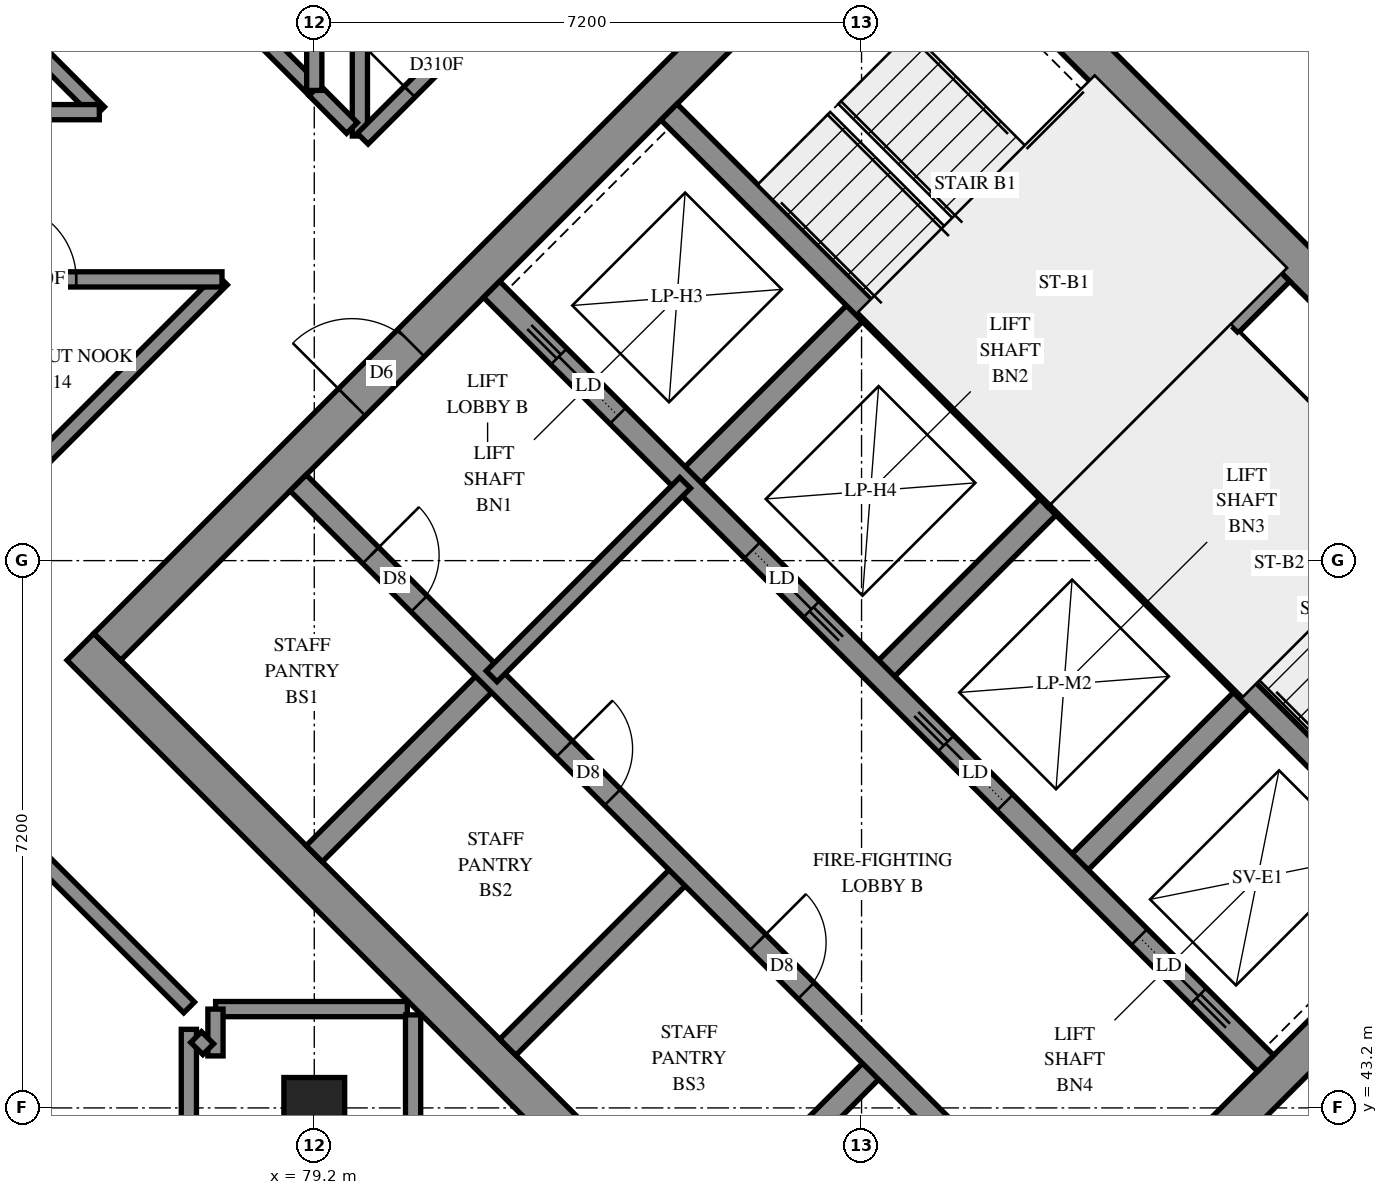
"""IFC4 building model, lengths in metres.
Left out: names, types, materials, properties, quantities, classifications, styles, units other than length and angle.
Written with IfcOpenShell. Run it as: python <this file> out.ifc"""

import sys

from ifc_helpers import new_model, si_unit, direction, frame, frame_2d, origin, origin_2d, place, context, subcontext, project, spatial, rectangle, extrude, element, fill, save


model = new_model("IFC4")
c1 = context("Model", 3, precision=1e-05, world=origin(), true_north=direction((0.0, 1.0)))
c2 = subcontext(c1, "Body", "Model", "MODEL_VIEW")
j1 = project(units=[si_unit("LENGTHUNIT", "METRE"), si_unit("PLANEANGLEUNIT", "RADIAN")], contexts=[c1])
p1 = place(None, origin())
s1 = spatial("IfcSite", under=j1, at=p1, CompositionType="ELEMENT")
p2 = place(p1, origin())
s2 = spatial("IfcBuilding", under=s1, at=p2, CompositionType="ELEMENT")
p3 = place(p2, frame((0.0, 0.0, 199.8)))
s3 = spatial("IfcBuildingStorey", under=s2, at=p3, CompositionType="ELEMENT", Elevation=199.8)
p4 = place(p3, frame((79.2, 43.2, 0.0), z_axis=(0.0, 0.0, 1.0), x_axis=(1.0, 0.0, 0.0)))
e1 = element("IfcColumn", 1, at=p4, inside=s3, PredefinedType="COLUMN", context=c2, shape_type="SweptSolid", body=[
    extrude(rectangle(XDim=0.8, YDim=0.8, at=origin_2d()), origin(), (0.0, 0.0, 1.0), 3.1),
])
p5 = place(p3, frame((76.124, 49.267, -0.3), z_axis=(0.0, 0.0, 1.0), x_axis=(0.7071067812, -0.7071067812, 0.0)))
e2 = element("IfcWall", 2, at=p5, inside=s3, PredefinedType="SHEAR", context=c2, shape_type="SweptSolid", body=[
    extrude(rectangle(XDim=15.4, YDim=0.5, at=frame_2d((7.7, 0.0))), origin(), (0.0, 0.0, 1.0), 2.7),
])
p6 = place(p3, frame((86.66, 59.802, -0.3), z_axis=(0.0, 0.0, 1.0), x_axis=(0.7071067812, -0.7071067812, 0.0)))
e3 = element("IfcWall", 3, at=p6, inside=s3, PredefinedType="SHEAR", context=c2, shape_type="SweptSolid", body=[
    extrude(rectangle(XDim=15.4, YDim=0.5, at=frame_2d((7.7, 0.0))), origin(), (0.0, 0.0, 1.0), 2.7),
])
p7 = place(p6, frame((10.5, 0.0, 0.3)))
e4 = element("IfcOpeningElement", 4, at=p7, cuts=e3, PredefinedType="OPENING", context=c2, shape_type="SweptSolid", body=[
    extrude(rectangle(XDim=0.8, YDim=2.1, at=frame_2d((0.4, 1.05))), frame((0.0, 0.26, 0.0), z_axis=(0.0, -1.0, 0.0), x_axis=(1.0, 0.0, 0.0)), (0.0, 0.0, 1.0), 0.52),
])
p8 = place(p3, frame((76.478, 49.267, -0.3), z_axis=(0.0, 0.0, 1.0), x_axis=(0.7071067812, 0.7071067812, 0.0)))
e5 = element("IfcWall", 5, at=p8, inside=s3, PredefinedType="SHEAR", context=c2, shape_type="SweptSolid", body=[
    extrude(rectangle(XDim=14.4, YDim=0.5, at=frame_2d((7.2, 0.0))), origin(), (0.0, 0.0, 1.0), 2.7),
])
p9 = place(p8, frame((4.55, 0.0, 0.3)))
e6 = element("IfcOpeningElement", 6, at=p9, cuts=e5, PredefinedType="OPENING", context=c2, shape_type="SweptSolid", body=[
    extrude(rectangle(XDim=1.1, YDim=2.1, at=frame_2d((0.55, 1.05))), frame((0.0, 0.26, 0.0), z_axis=(0.0, -1.0, 0.0), x_axis=(1.0, 0.0, 0.0)), (0.0, 0.0, 1.0), 0.52),
])
p10 = place(p8, frame((11.35, 0.0, 0.3)))
e7 = element("IfcOpeningElement", 7, at=p10, cuts=e5, PredefinedType="OPENING", context=c2, shape_type="SweptSolid", body=[
    extrude(rectangle(XDim=1.1, YDim=2.1, at=frame_2d((0.55, 1.05))), frame((0.0, 0.26, 0.0), z_axis=(0.0, -1.0, 0.0), x_axis=(1.0, 0.0, 0.0)), (0.0, 0.0, 1.0), 0.52),
])
p11 = place(p3, frame((87.013, 38.731, -0.3), z_axis=(0.0, 0.0, 1.0), x_axis=(0.7071067812, 0.7071067812, 0.0)))
e8 = element("IfcWall", 8, at=p11, inside=s3, PredefinedType="SHEAR", context=c2, shape_type="SweptSolid", body=[
    extrude(rectangle(XDim=14.4, YDim=0.5, at=frame_2d((7.2, 0.0))), origin(), (0.0, 0.0, 1.0), 2.7),
])
p12 = place(p11, frame((4.55, 0.0, 0.3)))
e9 = element("IfcOpeningElement", 9, at=p12, cuts=e8, PredefinedType="OPENING", context=c2, shape_type="SweptSolid", body=[
    extrude(rectangle(XDim=1.1, YDim=2.1, at=frame_2d((0.55, 1.05))), frame((0.0, 0.26, 0.0), z_axis=(0.0, -1.0, 0.0), x_axis=(1.0, 0.0, 0.0)), (0.0, 0.0, 1.0), 0.52),
])
p13 = place(p11, frame((11.35, 0.0, 0.3)))
e10 = element("IfcOpeningElement", 10, at=p13, cuts=e8, PredefinedType="OPENING", context=c2, shape_type="SweptSolid", body=[
    extrude(rectangle(XDim=1.1, YDim=2.1, at=frame_2d((0.55, 1.05))), frame((0.0, 0.26, 0.0), z_axis=(0.0, -1.0, 0.0), x_axis=(1.0, 0.0, 0.0)), (0.0, 0.0, 1.0), 0.52),
])
for number, where, z_axis, x_axis in (
    (11, (79.2, 46.544, 0.0), (0.0, 0.0, 1.0), (0.707, 0.707, 0.0)),
    (12, (84.079, 51.423, 0.0), (0.0, 0.0, 1.0), (0.707, 0.707, 0.0)),
):
    element("IfcWall", number, at=place(p3, frame(where, z_axis=z_axis, x_axis=x_axis)), inside=s3, PredefinedType="SOLIDWALL", context=c2, shape_type="SweptSolid", body=[
        extrude(rectangle(XDim=3.3, YDim=0.3, at=frame_2d((1.65, 0.0))), origin(), (0.0, 0.0, 1.0), 3.1),
    ])
p14 = place(p3, frame((81.746, 43.999, 0.0), z_axis=(0.0, 0.0, 1.0), x_axis=(0.7071067812, 0.7071067812, 0.0)))
e13 = element("IfcWall", 13, at=p14, inside=s3, PredefinedType="SOLIDWALL", context=c2, shape_type="SweptSolid", body=[
    extrude(rectangle(XDim=3.3, YDim=0.3, at=frame_2d((1.65, 0.0))), origin(), (0.0, 0.0, 1.0), 3.1),
])
p15 = place(p3, frame((86.625, 48.878, 0.0), z_axis=(0.0, 0.0, 1.0), x_axis=(0.7071067812, 0.7071067812, 0.0)))
e14 = element("IfcWall", 14, at=p15, inside=s3, PredefinedType="SOLIDWALL", context=c2, shape_type="SweptSolid", body=[
    extrude(rectangle(XDim=3.3, YDim=0.3, at=frame_2d((1.65, 0.0))), origin(), (0.0, 0.0, 1.0), 3.1),
])
p16 = place(p3, frame((84.291, 41.453, 0.0), z_axis=(0.0, 0.0, 1.0), x_axis=(0.7071067812, 0.7071067812, 0.0)))
e15 = element("IfcWall", 15, at=p16, inside=s3, PredefinedType="SOLIDWALL", context=c2, shape_type="SweptSolid", body=[
    extrude(rectangle(XDim=3.3, YDim=0.3, at=frame_2d((1.65, 0.0))), origin(), (0.0, 0.0, 1.0), 3.1),
])
p17 = place(p3, frame((89.17, 46.332, 0.0), z_axis=(0.0, 0.0, 1.0), x_axis=(0.7071067812, 0.7071067812, 0.0)))
e16 = element("IfcWall", 16, at=p17, inside=s3, PredefinedType="SOLIDWALL", context=c2, shape_type="SweptSolid", body=[
    extrude(rectangle(XDim=3.3, YDim=0.3, at=frame_2d((1.65, 0.0))), origin(), (0.0, 0.0, 1.0), 3.1),
])
p18 = place(p3, frame((78.988, 51.423, 0.0), z_axis=(0.0, 0.0, 1.0), x_axis=(0.7071067812, -0.7071067812, 0.0)))
e17 = element("IfcWall", 17, at=p18, inside=s3, PredefinedType="SOLIDWALL", context=c2, shape_type="SweptSolid", body=[
    extrude(rectangle(XDim=14.4, YDim=0.3, at=frame_2d((7.2, 0.0))), origin(), (0.0, 0.0, 1.0), 3.1),
])
p19 = place(p18, frame((1.35, 0.0, 0.0)))
e18 = element("IfcOpeningElement", 18, at=p19, cuts=e17, PredefinedType="OPENING", context=c2, shape_type="SweptSolid", body=[
    extrude(rectangle(XDim=0.9, YDim=2.1, at=frame_2d((0.45, 1.05))), frame((0.0, 0.16, 0.0), z_axis=(0.0, -1.0, 0.0), x_axis=(1.0, 0.0, 0.0)), (0.0, 0.0, 1.0), 0.32),
])
p20 = place(p18, frame((4.95, 0.0, 0.0)))
e19 = element("IfcOpeningElement", 19, at=p20, cuts=e17, PredefinedType="OPENING", context=c2, shape_type="SweptSolid", body=[
    extrude(rectangle(XDim=0.9, YDim=2.1, at=frame_2d((0.45, 1.05))), frame((0.0, 0.16, 0.0), z_axis=(0.0, -1.0, 0.0), x_axis=(1.0, 0.0, 0.0)), (0.0, 0.0, 1.0), 0.32),
])
p21 = place(p18, frame((8.55, 0.0, 0.0)))
e20 = element("IfcOpeningElement", 20, at=p21, cuts=e17, PredefinedType="OPENING", context=c2, shape_type="SweptSolid", body=[
    extrude(rectangle(XDim=0.9, YDim=2.1, at=frame_2d((0.45, 1.05))), frame((0.0, 0.16, 0.0), z_axis=(0.0, -1.0, 0.0), x_axis=(1.0, 0.0, 0.0)), (0.0, 0.0, 1.0), 0.32),
])
p22 = place(p18, frame((12.05, 0.0, 0.0)))
e21 = element("IfcOpeningElement", 21, at=p22, cuts=e17, PredefinedType="OPENING", context=c2, shape_type="SweptSolid", body=[
    extrude(rectangle(XDim=1.1, YDim=2.1, at=frame_2d((0.55, 1.05))), frame((0.0, 0.16, 0.0), z_axis=(0.0, -1.0, 0.0), x_axis=(1.0, 0.0, 0.0)), (0.0, 0.0, 1.0), 0.32),
])
p23 = place(p3, frame((81.534, 53.969, 0.0), z_axis=(0.0, 0.0, 1.0), x_axis=(0.707103309, -0.7071102534, 0.0)))
e22 = element("IfcWall", 22, at=p23, inside=s3, PredefinedType="SOLIDWALL", context=c2, shape_type="SweptSolid", body=[
    extrude(rectangle(XDim=14.4, YDim=0.3, at=frame_2d((7.2, 0.0))), origin(), (0.0, 0.0, 1.0), 3.1),
])
p24 = place(p23, frame((1.25, 0.0, 0.0)))
e23 = element("IfcOpeningElement", 23, at=p24, cuts=e22, PredefinedType="OPENING", context=c2, shape_type="SweptSolid", body=[
    extrude(rectangle(XDim=1.1, YDim=2.1, at=frame_2d((0.55, 1.05))), frame((0.0, 0.16, 0.0), z_axis=(0.0, -1.0, 0.0), x_axis=(1.0, 0.0, 0.0)), (0.0, 0.0, 1.0), 0.32),
])
p25 = place(p23, frame((4.85, 0.0, 0.0)))
e24 = element("IfcOpeningElement", 24, at=p25, cuts=e22, PredefinedType="OPENING", context=c2, shape_type="SweptSolid", body=[
    extrude(rectangle(XDim=1.1, YDim=2.1, at=frame_2d((0.55, 1.05))), frame((0.0, 0.16, 0.0), z_axis=(0.0, -1.0, 0.0), x_axis=(1.0, 0.0, 0.0)), (0.0, 0.0, 1.0), 0.32),
])
p26 = place(p23, frame((8.45, 0.0, 0.0)))
e25 = element("IfcOpeningElement", 25, at=p26, cuts=e22, PredefinedType="OPENING", context=c2, shape_type="SweptSolid", body=[
    extrude(rectangle(XDim=1.1, YDim=2.1, at=frame_2d((0.55, 1.05))), frame((0.0, 0.16, 0.0), z_axis=(0.0, -1.0, 0.0), x_axis=(1.0, 0.0, 0.0)), (0.0, 0.0, 1.0), 0.32),
])
p27 = place(p23, frame((12.05, 0.0, 0.0)))
e26 = element("IfcOpeningElement", 26, at=p27, cuts=e22, PredefinedType="OPENING", context=c2, shape_type="SweptSolid", body=[
    extrude(rectangle(XDim=1.1, YDim=2.1, at=frame_2d((0.55, 1.05))), frame((0.0, 0.16, 0.0), z_axis=(0.0, -1.0, 0.0), x_axis=(1.0, 0.0, 0.0)), (0.0, 0.0, 1.0), 0.32),
])
for number, where, z_axis, x_axis in (
    (27, (83.867, 56.302, 0.0), (0.0, 0.0, 1.0), (0.707, -0.707, 0.0)),
    (28, (88.958, 51.211, 0.0), (0.0, 0.0, 1.0), (0.707, -0.707, 0.0)),
):
    element("IfcWall", number, at=place(p3, frame(where, z_axis=z_axis, x_axis=x_axis)), inside=s3, PredefinedType="SOLIDWALL", context=c2, shape_type="SweptSolid", body=[
        extrude(rectangle(XDim=7.2, YDim=0.3, at=frame_2d((3.6, 0.0))), origin(), (0.0, 0.0, 1.0), 3.1),
    ])
p28 = place(p3, frame((88.958, 51.211, 0.0), z_axis=(0.0, 0.0, 1.0), x_axis=(0.7071067812, 0.7071067812, 0.0)))
e29 = element("IfcWall", 29, at=p28, inside=s3, PredefinedType="SOLIDWALL", context=c2, shape_type="SweptSolid", body=[
    extrude(rectangle(XDim=4.2, YDim=0.3, at=frame_2d((2.1, 0.0))), origin(), (0.0, 0.0, 1.0), 3.1),
])
p29 = place(p3, frame((91.313, 53.354, 0.0), z_axis=(0.0, 0.0, 1.0), x_axis=(0.7071067812, -0.7071067812, 0.0)))
e30 = element("IfcWall", 30, at=p29, inside=s3, PredefinedType="PARTITIONING", context=c2, shape_type="SweptSolid", body=[
    extrude(rectangle(XDim=5.95, YDim=0.15, at=frame_2d((2.975, 0.0))), origin(), (0.0, 0.0, 1.0), 3.1),
])
p30 = place(p3, frame((81.534, 48.878, 0.0), z_axis=(0.0, 0.0, 1.0), x_axis=(0.707092892, 0.7071206701, 0.0)))
e31 = element("IfcWall", 31, at=p30, inside=s3, PredefinedType="PARTITIONING", context=c2, shape_type="SweptSolid", body=[
    extrude(rectangle(XDim=3.6, YDim=0.2, at=frame_2d((1.8, 0.0))), origin(), (0.0, 0.0, 1.0), 3.1),
])
p31 = place(p3, frame((79.8, 55.986, 0.0), z_axis=(0.0, 0.0, 1.0), x_axis=(0.0, 1.0, 0.0)))
e32 = element("IfcWall", 32, at=p31, inside=s3, PredefinedType="PARTITIONING", context=c2, shape_type="SweptSolid", body=[
    extrude(rectangle(XDim=11.522, YDim=0.2, at=frame_2d((5.761, 0.0))), origin(), (0.0, 0.0, 1.0), 3.1),
])
p32 = place(p3, frame((79.837, 55.951, 0.0), z_axis=(0.0, 0.0, 1.0), x_axis=(0.7071067812, 0.7071067812, 0.0)))
e33 = element("IfcWall", 33, at=p32, inside=s3, PredefinedType="PARTITIONING", context=c2, shape_type="SweptSolid", body=[
    extrude(rectangle(XDim=9.897, YDim=0.2, at=frame_2d((4.948, 0.0))), origin(), (0.0, 0.0, 1.0), 3.1),
])
p33 = place(p32, frame((0.873, 0.0, 0.0)))
e34 = element("IfcOpeningElement", 34, at=p33, cuts=e33, PredefinedType="OPENING", context=c2, shape_type="SweptSolid", body=[
    extrude(rectangle(XDim=1.0, YDim=2.1, at=frame_2d((0.5, 1.05))), frame((0.0, 0.11, 0.0), z_axis=(0.0, -1.0, 0.0), x_axis=(1.0, 0.0, 0.0)), (0.0, 0.0, 1.0), 0.22),
])
p34 = place(p3, frame((86.835, 62.945, 0.0), z_axis=(0.0, 0.0, 1.0), x_axis=(0.7071067812, -0.7071067812, 0.0)))
e35 = element("IfcWall", 35, at=p34, inside=s3, PredefinedType="PARTITIONING", context=c2, shape_type="SweptSolid", body=[
    extrude(rectangle(XDim=9.798, YDim=0.2, at=frame_2d((4.899, 0.0))), origin(), (0.0, 0.0, 1.0), 3.1),
])
p35 = place(p3, frame((74.489, 61.303, 0.0), z_axis=(0.0, 0.0, 1.0), x_axis=(0.7071892763, -0.7070242765, 0.0)))
e36 = element("IfcWall", 36, at=p35, inside=s3, PredefinedType="PARTITIONING", context=c2, shape_type="SweptSolid", body=[
    extrude(rectangle(XDim=6.667, YDim=0.2, at=frame_2d((3.333, 0.0))), origin(), (0.0, 0.0, 1.0), 3.1),
])
p36 = place(p3, frame((74.601, 50.715, 0.0), z_axis=(0.0, 0.0, 1.0), x_axis=(0.7071067812, 0.7071067812, 0.0)))
e37 = element("IfcWall", 37, at=p36, inside=s3, PredefinedType="PARTITIONING", context=c2, shape_type="SweptSolid", body=[
    extrude(rectangle(XDim=4.786, YDim=0.2, at=frame_2d((2.393, 0.0))), origin(), (0.0, 0.0, 1.0), 3.1),
])
p37 = place(p3, frame((74.272, 47.803, 0.0), z_axis=(0.0, 0.0, 1.0), x_axis=(0.7071067812, -0.7071067812, 0.0)))
e38 = element("IfcWall", 38, at=p37, inside=s3, PredefinedType="PARTITIONING", context=c2, shape_type="SweptSolid", body=[
    extrude(rectangle(XDim=4.641, YDim=0.2, at=frame_2d((2.321, 0.0))), origin(), (0.0, 0.0, 1.0), 3.1),
])
p38 = place(p37, frame((0.416, 0.0, 0.0)))
e39 = element("IfcOpeningElement", 39, at=p38, cuts=e38, PredefinedType="OPENING", context=c2, shape_type="SweptSolid", body=[
    extrude(rectangle(XDim=1.0, YDim=2.1, at=frame_2d((0.5, 1.05))), frame((0.0, 0.11, 0.0), z_axis=(0.0, -1.0, 0.0), x_axis=(1.0, 0.0, 0.0)), (0.0, 0.0, 1.0), 0.22),
])
p39 = place(p3, frame((74.602, 54.1, 0.0), z_axis=(0.0, 0.0, 1.0), x_axis=(1.0, 0.0, 0.0)))
e40 = element("IfcWall", 40, at=p39, inside=s3, PredefinedType="PARTITIONING", context=c2, shape_type="SweptSolid", body=[
    extrude(rectangle(XDim=3.384, YDim=0.2, at=frame_2d((1.692, 0.0))), origin(), (0.0, 0.0, 1.0), 3.1),
])
p40 = place(p39, frame((0.467, 0.0, 0.0)))
e41 = element("IfcOpeningElement", 41, at=p40, cuts=e40, PredefinedType="OPENING", context=c2, shape_type="SweptSolid", body=[
    extrude(rectangle(XDim=1.0, YDim=2.1, at=frame_2d((0.5, 1.05))), frame((0.0, 0.11, 0.0), z_axis=(0.0, -1.0, 0.0), x_axis=(1.0, 0.0, 0.0)), (0.0, 0.0, 1.0), 0.22),
])
for number, where, z_axis, x_axis in (
    (42, (77.902, 44.5, 0.0), (0.0, 0.0, 1.0), (1.0, 0.0, 0.0)),
    (43, (80.5, 41.902, 0.0), (0.0, 0.0, 1.0), (0.0, 1.0, 0.0)),
):
    element("IfcWall", number, at=place(p3, frame(where, z_axis=z_axis, x_axis=x_axis)), inside=s3, PredefinedType="PARTITIONING", context=c2, shape_type="SweptSolid", body=[
        extrude(rectangle(XDim=2.522, YDim=0.2, at=frame_2d((1.261, 0.0))), origin(), (0.0, 0.0, 1.0), 3.1),
    ])
p41 = place(p3, frame((74.599, 58.069, 0.0), z_axis=(0.0, 0.0, 1.0), x_axis=(0.7071067812, -0.7071067812, 0.0)))
e44 = element("IfcWall", 44, at=p41, inside=s3, PredefinedType="PARTITIONING", context=c2, shape_type="SweptSolid", body=[
    extrude(rectangle(XDim=2.503, YDim=0.2, at=frame_2d((1.252, 0.0))), origin(), (0.0, 0.0, 1.0), 3.1),
])
p42 = place(p3, frame((77.55, 41.637, 0.0), z_axis=(0.0, 0.0, 1.0), x_axis=(0.0, 1.0, 0.0)))
e45 = element("IfcWall", 45, at=p42, inside=s3, PredefinedType="PARTITIONING", context=c2, shape_type="SweptSolid", body=[
    extrude(rectangle(XDim=2.597, YDim=0.2, at=frame_2d((1.298, 0.0))), origin(), (0.0, 0.0, 1.0), 3.1),
])
p43 = place(p3, frame((74.602, 56.3, 0.0), z_axis=(0.0, 0.0, 1.0), x_axis=(1.0, 0.0, 0.0)))
e46 = element("IfcWall", 46, at=p43, inside=s3, PredefinedType="PARTITIONING", context=c2, shape_type="SweptSolid", body=[
    extrude(rectangle(XDim=1.77, YDim=0.2, at=frame_2d((0.885, 0.0))), origin(), (0.0, 0.0, 1.0), 3.1),
])
p44 = place(p3, frame((79.202, 56.588, 0.0), z_axis=(0.0, 0.0, 1.0), x_axis=(0.7056768426, -0.7085338339, 0.0)))
e47 = element("IfcWall", 47, at=p44, inside=s3, PredefinedType="PARTITIONING", context=c2, shape_type="SweptSolid", body=[
    extrude(rectangle(XDim=0.7, YDim=0.2, at=frame_2d((0.35, 0.0))), origin(), (0.0, 0.0, 1.0), 3.1),
])
p45 = place(p3, frame((77.9, 43.884, 0.0), z_axis=(0.0, 0.0, 1.0), x_axis=(0.0, 1.0, 0.0)))
e48 = element("IfcWall", 48, at=p45, inside=s3, PredefinedType="PARTITIONING", context=c2, shape_type="SweptSolid", body=[
    extrude(rectangle(XDim=0.616, YDim=0.2, at=frame_2d((0.308, 0.0))), origin(), (0.0, 0.0, 1.0), 3.1),
])
p46 = place(p3, frame((79.2, 56.586, 0.0), z_axis=(0.0, 0.0, 1.0), x_axis=(0.0, 1.0, 0.0)))
e49 = element("IfcWall", 49, at=p46, inside=s3, PredefinedType="PARTITIONING", context=c2, shape_type="SweptSolid", body=[
    extrude(rectangle(XDim=0.614, YDim=0.2, at=frame_2d((0.307, 0.0))), origin(), (0.0, 0.0, 1.0), 3.1),
])
p47 = place(p3, frame((77.646, 44.132, 0.0), z_axis=(0.0, 0.0, 1.0), x_axis=(0.7068844555, -0.707329037, 0.0)))
e50 = element("IfcWall", 50, at=p47, inside=s3, PredefinedType="PARTITIONING", context=c2, shape_type="SweptSolid", body=[
    extrude(rectangle(XDim=0.225, YDim=0.2, at=frame_2d((0.112, 0.0))), origin(), (0.0, 0.0, 1.0), 3.1),
])
p48 = place(p9, origin())
e51 = element("IfcDoor", 51, at=p48, inside=s3, OperationType="DOUBLE_DOOR_SINGLE_SWING", PredefinedType="DOOR", context=c2, shape_type="SweptSolid", body=[
    extrude(rectangle(XDim=1.1, YDim=2.1, at=frame_2d((0.55, 1.05))), frame((0.0, 0.025, 0.0), z_axis=(0.0, -1.0, 0.0), x_axis=(1.0, 0.0, 0.0)), (0.0, 0.0, 1.0), 0.05),
])
fill(e6, e51)
p49 = place(p19, origin())
e52 = element("IfcDoor", 52, at=p49, inside=s3, OperationType="SINGLE_SWING_LEFT", PredefinedType="DOOR", context=c2, shape_type="SweptSolid", body=[
    extrude(rectangle(XDim=0.9, YDim=2.1, at=frame_2d((0.45, 1.05))), frame((0.0, 0.025, 0.0), z_axis=(0.0, -1.0, 0.0), x_axis=(1.0, 0.0, 0.0)), (0.0, 0.0, 1.0), 0.05),
])
fill(e18, e52)
p50 = place(p20, origin())
e53 = element("IfcDoor", 53, at=p50, inside=s3, OperationType="SINGLE_SWING_LEFT", PredefinedType="DOOR", context=c2, shape_type="SweptSolid", body=[
    extrude(rectangle(XDim=0.9, YDim=2.1, at=frame_2d((0.45, 1.05))), frame((0.0, 0.025, 0.0), z_axis=(0.0, -1.0, 0.0), x_axis=(1.0, 0.0, 0.0)), (0.0, 0.0, 1.0), 0.05),
])
fill(e19, e53)
p51 = place(p21, origin())
e54 = element("IfcDoor", 54, at=p51, inside=s3, OperationType="SINGLE_SWING_LEFT", PredefinedType="DOOR", context=c2, shape_type="SweptSolid", body=[
    extrude(rectangle(XDim=0.9, YDim=2.1, at=frame_2d((0.45, 1.05))), frame((0.0, 0.025, 0.0), z_axis=(0.0, -1.0, 0.0), x_axis=(1.0, 0.0, 0.0)), (0.0, 0.0, 1.0), 0.05),
])
fill(e20, e54)
p52 = place(p24, origin())
e55 = element("IfcDoor", 55, at=p52, inside=s3, OperationType="SLIDING_TO_LEFT", PredefinedType="DOOR", context=c2, shape_type="SweptSolid", body=[
    extrude(rectangle(XDim=1.1, YDim=2.1, at=frame_2d((0.55, 1.05))), frame((0.0, 0.025, 0.0), z_axis=(0.0, -1.0, 0.0), x_axis=(1.0, 0.0, 0.0)), (0.0, 0.0, 1.0), 0.05),
])
fill(e23, e55)
p53 = place(p25, origin())
e56 = element("IfcDoor", 56, at=p53, inside=s3, OperationType="SLIDING_TO_RIGHT", PredefinedType="DOOR", context=c2, shape_type="SweptSolid", body=[
    extrude(rectangle(XDim=1.1, YDim=2.1, at=frame_2d((0.55, 1.05))), frame((0.0, 0.025, 0.0), z_axis=(0.0, -1.0, 0.0), x_axis=(1.0, 0.0, 0.0)), (0.0, 0.0, 1.0), 0.05),
])
fill(e24, e56)
p54 = place(p26, origin())
e57 = element("IfcDoor", 57, at=p54, inside=s3, OperationType="SLIDING_TO_LEFT", PredefinedType="DOOR", context=c2, shape_type="SweptSolid", body=[
    extrude(rectangle(XDim=1.1, YDim=2.1, at=frame_2d((0.55, 1.05))), frame((0.0, 0.025, 0.0), z_axis=(0.0, -1.0, 0.0), x_axis=(1.0, 0.0, 0.0)), (0.0, 0.0, 1.0), 0.05),
])
fill(e25, e57)
p55 = place(p27, origin())
e58 = element("IfcDoor", 58, at=p55, inside=s3, OperationType="SLIDING_TO_RIGHT", PredefinedType="DOOR", context=c2, shape_type="SweptSolid", body=[
    extrude(rectangle(XDim=1.1, YDim=2.1, at=frame_2d((0.55, 1.05))), frame((0.0, 0.025, 0.0), z_axis=(0.0, -1.0, 0.0), x_axis=(1.0, 0.0, 0.0)), (0.0, 0.0, 1.0), 0.05),
])
fill(e26, e58)
p56 = place(p40, origin())
e59 = element("IfcDoor", 59, at=p56, inside=s3, OperationType="SINGLE_SWING_RIGHT", PredefinedType="DOOR", context=c2, shape_type="SweptSolid", body=[
    extrude(rectangle(XDim=1.0, YDim=2.1, at=frame_2d((0.5, 1.05))), frame((0.0, 0.025, 0.0), z_axis=(0.0, -1.0, 0.0), x_axis=(1.0, 0.0, 0.0)), (0.0, 0.0, 1.0), 0.05),
])
fill(e41, e59)
p57 = place(p33, origin())
e60 = element("IfcDoor", 60, at=p57, inside=s3, OperationType="SINGLE_SWING_RIGHT", PredefinedType="DOOR", context=c2, shape_type="SweptSolid", body=[
    extrude(rectangle(XDim=1.0, YDim=2.1, at=frame_2d((0.5, 1.05))), frame((0.0, 0.025, 0.0), z_axis=(0.0, -1.0, 0.0), x_axis=(1.0, 0.0, 0.0)), (0.0, 0.0, 1.0), 0.05),
])
fill(e34, e60)
save(model, sys.argv[1])
